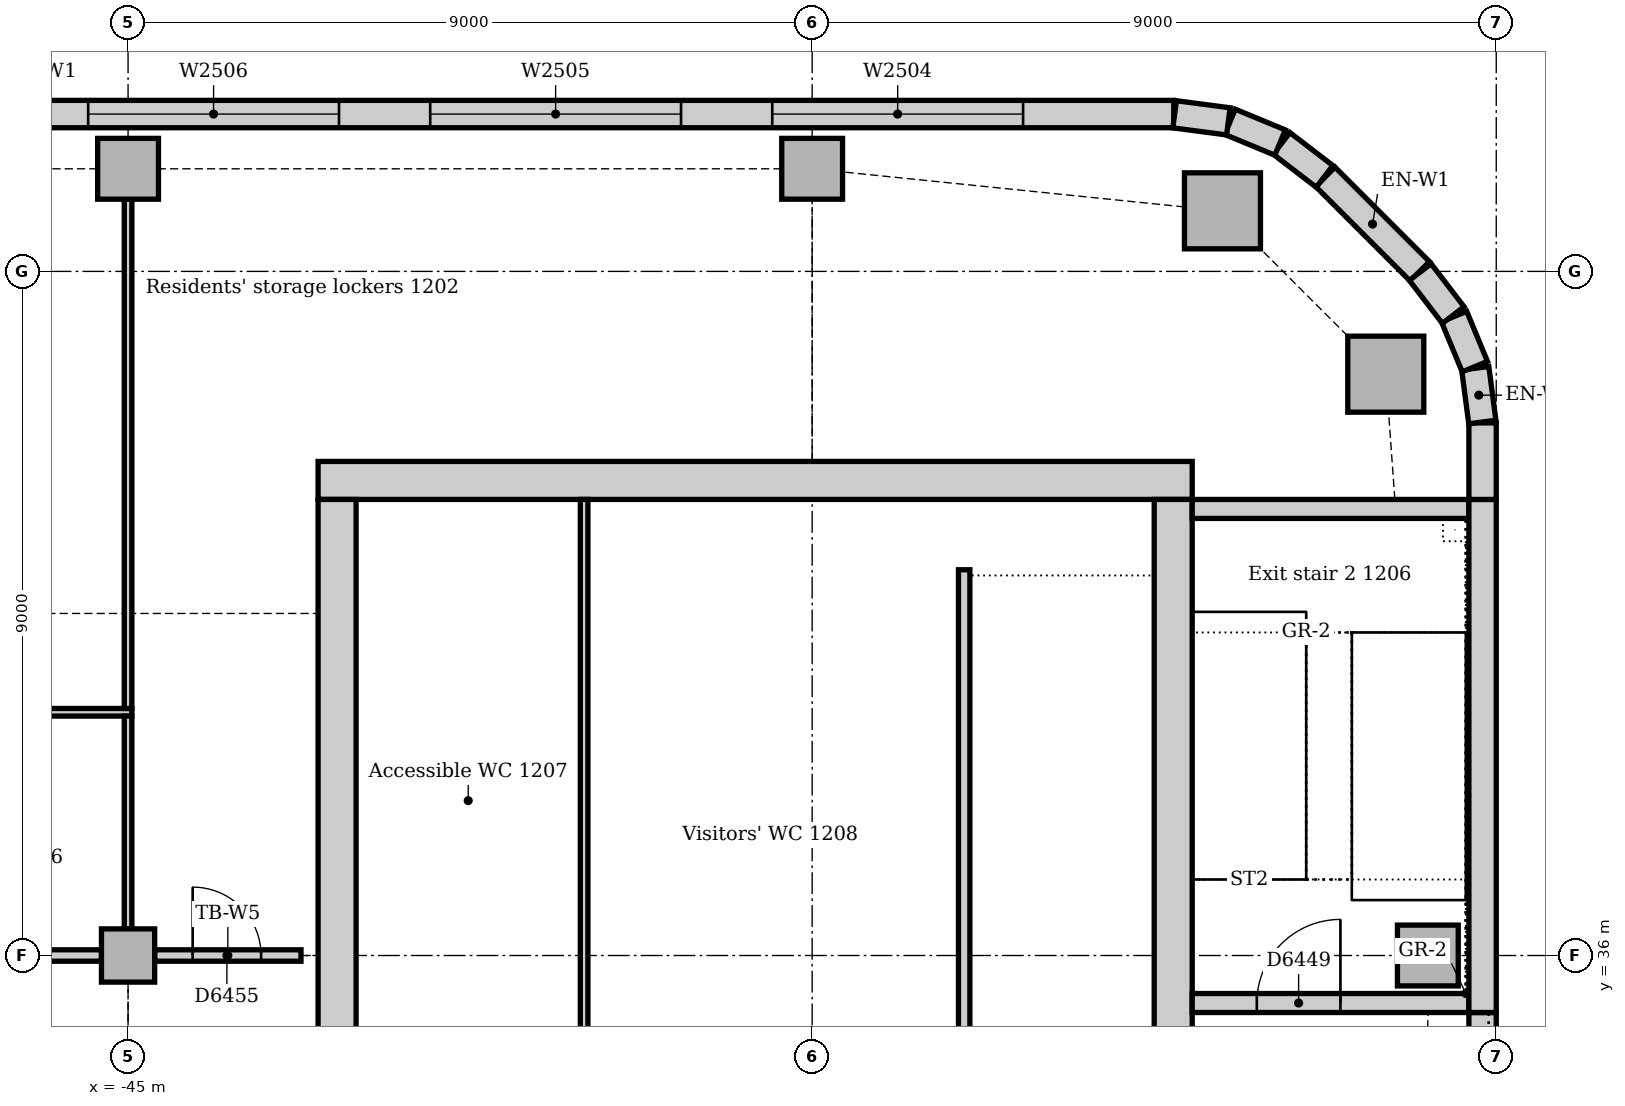
"""IFC4 building model, lengths in metres.
Left out: names, types, materials, properties, quantities, classifications, styles, units other than length and angle.
Written with IfcOpenShell. Run it as: python <this file> out.ifc"""

import sys

from ifc_helpers import new_model, si_unit, direction, frame, frame_2d, origin, origin_2d, place, context, subcontext, project, spatial, rectangle, extrude, element, fill, save


model = new_model("IFC4")
c1 = context("Model", 3, precision=1e-05, world=origin(), true_north=direction((0.0, 1.0)))
c2 = subcontext(c1, "Body", "Model", "MODEL_VIEW")
j1 = project(units=[si_unit("LENGTHUNIT", "METRE"), si_unit("PLANEANGLEUNIT", "RADIAN")], contexts=[c1])
p1 = place(None, origin())
s1 = spatial("IfcSite", under=j1, at=p1, CompositionType="ELEMENT")
p2 = place(p1, origin())
s2 = spatial("IfcBuilding", under=s1, at=p2, CompositionType="ELEMENT")
p3 = place(p2, frame((0.0, 0.0, 55.0)))
s3 = spatial("IfcBuildingStorey", under=s2, at=p3, CompositionType="ELEMENT", Elevation=55.0)
p4 = place(p3, frame((-31.0, 42.25, 0.0), z_axis=(0.0, 0.0, 1.0), x_axis=(-1.0, 0.0, 0.0)))
e1 = element("IfcWall", 1, at=p4, inside=s3, PredefinedType="SOLIDWALL", context=c2, shape_type="SweptSolid", body=[
    extrude(rectangle(XDim=11.5, YDim=0.5, at=frame_2d((5.75, 0.0))), origin(), (0.0, 0.0, 1.0), 4.0),
])
p5 = place(p3, frame((-31.25, 30.5, 0.0), z_axis=(0.0, 0.0, 1.0), x_axis=(0.0, 1.0, 0.0)))
e2 = element("IfcWall", 2, at=p5, inside=s3, PredefinedType="SOLIDWALL", context=c2, shape_type="SweptSolid", body=[
    extrude(rectangle(XDim=11.5, YDim=0.5, at=frame_2d((5.75, 0.0))), origin(), (0.0, 0.0, 1.0), 4.0),
])
p6 = place(p5, frame((0.85, 0.0, 0.0)))
e3 = element("IfcOpeningElement", 3, at=p6, cuts=e2, PredefinedType="OPENING", context=c2, shape_type="SweptSolid", body=[
    extrude(rectangle(XDim=1.8, YDim=2.1, at=frame_2d((0.9, 1.05))), frame((0.0, 0.26, 0.0), z_axis=(0.0, -1.0, 0.0), x_axis=(1.0, 0.0, 0.0)), (0.0, 0.0, 1.0), 0.52),
])
p7 = place(p3, frame((-42.25, 42.0, 0.0), z_axis=(0.0, 0.0, 1.0), x_axis=(0.0, -1.0, 0.0)))
e4 = element("IfcWall", 4, at=p7, inside=s3, PredefinedType="SOLIDWALL", context=c2, shape_type="SweptSolid", body=[
    extrude(rectangle(XDim=11.5, YDim=0.5, at=frame_2d((5.75, 0.0))), origin(), (0.0, 0.0, 1.0), 4.0),
])
p8 = place(p7, frame((8.85, 0.0, 0.0)))
e5 = element("IfcOpeningElement", 5, at=p8, cuts=e4, PredefinedType="OPENING", context=c2, shape_type="SweptSolid", body=[
    extrude(rectangle(XDim=1.8, YDim=2.1, at=frame_2d((0.9, 1.05))), frame((0.0, 0.26, 0.0), z_axis=(0.0, -1.0, 0.0), x_axis=(1.0, 0.0, 0.0)), (0.0, 0.0, 1.0), 0.52),
])
p9 = place(p3, frame((-31.0, 35.375, 0.0), z_axis=(0.0, 0.0, 1.0), x_axis=(1.0, 0.0, 0.0)))
e6 = element("IfcWall", 6, at=p9, inside=s3, PredefinedType="SOLIDWALL", context=c2, shape_type="SweptSolid", body=[
    extrude(rectangle(XDim=3.64, YDim=0.25, at=frame_2d((1.82, 0.0))), origin(), (0.0, 0.0, 1.0), 4.0),
])
p10 = place(p9, frame((0.85, 0.0, 0.0)))
e7 = element("IfcOpeningElement", 7, at=p10, cuts=e6, PredefinedType="OPENING", context=c2, shape_type="SweptSolid", body=[
    extrude(rectangle(XDim=1.1, YDim=2.1, at=frame_2d((0.55, 1.05))), frame((0.0, 0.135, 0.0), z_axis=(0.0, -1.0, 0.0), x_axis=(1.0, 0.0, 0.0)), (0.0, 0.0, 1.0), 0.27),
])
p11 = place(p3, frame((-27.36, 41.875, 0.0), z_axis=(0.0, 0.0, 1.0), x_axis=(-1.0, 0.0, 0.0)))
e8 = element("IfcWall", 8, at=p11, inside=s3, PredefinedType="SOLIDWALL", context=c2, shape_type="SweptSolid", body=[
    extrude(rectangle(XDim=3.64, YDim=0.25, at=frame_2d((1.82, 0.0))), origin(), (0.0, 0.0, 1.0), 4.0),
])
for number, where, z_axis, x_axis in (
    (9, (-28.453, 43.648, 0.0), (0.0, 0.0, 1.0), (1.0, 0.0, 0.0)),
    (10, (-30.602, 45.797, 0.0), (0.0, 0.0, 1.0), (1.0, 0.0, 0.0)),
):
    element("IfcColumn", number, at=place(p3, frame(where, z_axis=z_axis, x_axis=x_axis)), inside=s3, PredefinedType="COLUMN", context=c2, shape_type="SweptSolid", body=[
        extrude(rectangle(XDim=1.0, YDim=1.0, at=origin_2d()), origin(), (0.0, 0.0, 1.0), 3.85),
    ])
p12 = place(p3, frame((-27.9, 36.0, 0.0), z_axis=(0.0, 0.0, 1.0), x_axis=(1.0, 0.0, 0.0)))
e11 = element("IfcColumn", 11, at=p12, inside=s3, PredefinedType="COLUMN", context=c2, shape_type="SweptSolid", body=[
    extrude(rectangle(XDim=0.8, YDim=0.8, at=origin_2d()), origin(), (0.0, 0.0, 1.0), 4.0),
])
for number, where, z_axis, x_axis in (
    (12, (-45.0, 46.35, 0.0), (0.0, 0.0, 1.0), (1.0, 0.0, 0.0)),
    (13, (-36.0, 46.35, 0.0), (0.0, 0.0, 1.0), (1.0, 0.0, 0.0)),
):
    element("IfcColumn", number, at=place(p3, frame(where, z_axis=z_axis, x_axis=x_axis)), inside=s3, PredefinedType="COLUMN", context=c2, shape_type="SweptSolid", body=[
        extrude(rectangle(XDim=0.8, YDim=0.8, at=origin_2d()), origin(), (0.0, 0.0, 1.0), 3.85),
    ])
p13 = place(p3, frame((-45.0, 36.0, 0.0), z_axis=(0.0, 0.0, 1.0), x_axis=(1.0, 0.0, 0.0)))
e14 = element("IfcColumn", 14, at=p13, inside=s3, PredefinedType="COLUMN", context=c2, shape_type="SweptSolid", body=[
    extrude(rectangle(XDim=0.7, YDim=0.7, at=origin_2d()), origin(), (0.0, 0.0, 1.0), 3.85),
])
p14 = place(p3, frame((-27.18, 27.75, 0.0), z_axis=(0.0, 0.0, 1.0), x_axis=(0.0, 1.0, 0.0)))
e15 = element("IfcWall", 15, at=p14, inside=s3, PredefinedType="STANDARD", context=c2, shape_type="SweptSolid", body=[
    extrude(rectangle(XDim=7.5, YDim=0.36, at=frame_2d((3.75, 0.0))), origin(), (0.0, 0.0, 1.0), 3.85),
])
p15 = place(p14, frame((2.85, 0.0, 1.2)))
e16 = element("IfcOpeningElement", 16, at=p15, cuts=e15, PredefinedType="OPENING", context=c2, shape_type="SweptSolid", body=[
    extrude(rectangle(XDim=1.8, YDim=1.2, at=frame_2d((0.9, 0.6))), frame((0.0, 0.19, 0.0), z_axis=(0.0, -1.0, 0.0), x_axis=(1.0, 0.0, 0.0)), (0.0, 0.0, 1.0), 0.38),
])
p16 = place(p3, frame((-27.18, 35.25, 0.0), z_axis=(0.0, 0.0, 1.0), x_axis=(0.0, 1.0, 0.0)))
e17 = element("IfcWall", 17, at=p16, inside=s3, PredefinedType="STANDARD", context=c2, shape_type="SweptSolid", body=[
    extrude(rectangle(XDim=6.75, YDim=0.36, at=frame_2d((3.375, 0.0))), origin(), (0.0, 0.0, 1.0), 3.85),
])
p17 = place(p3, frame((-27.18, 42.0, 0.0), z_axis=(0.0, 0.0, 1.0), x_axis=(0.0, 1.0, 0.0)))
e18 = element("IfcWall", 18, at=p17, inside=s3, PredefinedType="STANDARD", context=c2, shape_type="SweptSolid", body=[
    extrude(rectangle(XDim=1.007, YDim=0.36, at=frame_2d((0.504, 0.0))), origin(), (0.0, 0.0, 1.0), 3.85),
])
p18 = place(p3, frame((-28.006, 45.001, 0.0), z_axis=(0.0, 0.0, 1.0), x_axis=(-0.707106781187, 0.707106781187, 0.0)))
e19 = element("IfcWall", 19, at=p18, inside=s3, PredefinedType="STANDARD", context=c2, shape_type="SweptSolid", body=[
    extrude(rectangle(XDim=1.757, YDim=0.36, at=frame_2d((0.879, 0.0))), origin(), (0.0, 0.0, 1.0), 3.85),
])
p19 = place(p3, frame((-31.243, 47.07, 0.0), z_axis=(0.0, 0.0, 1.0), x_axis=(-1.0, 0.0, 0.0)))
e20 = element("IfcWall", 20, at=p19, inside=s3, PredefinedType="STANDARD", context=c2, shape_type="SweptSolid", body=[
    extrude(rectangle(XDim=29.765, YDim=0.36, at=frame_2d((14.882, 0.0))), origin(), (0.0, 0.0, 1.0), 3.85),
])
p20 = place(p19, frame((1.982, 0.0, 0.9)))
e21 = element("IfcOpeningElement", 21, at=p20, cuts=e20, PredefinedType="OPENING", context=c2, shape_type="SweptSolid", body=[
    extrude(rectangle(XDim=3.3, YDim=1.6, at=frame_2d((1.65, 0.8))), frame((0.0, 0.19, 0.0), z_axis=(0.0, -1.0, 0.0), x_axis=(1.0, 0.0, 0.0)), (0.0, 0.0, 1.0), 0.38),
])
p21 = place(p19, frame((6.482, 0.0, 0.9)))
e22 = element("IfcOpeningElement", 22, at=p21, cuts=e20, PredefinedType="OPENING", context=c2, shape_type="SweptSolid", body=[
    extrude(rectangle(XDim=3.3, YDim=1.6, at=frame_2d((1.65, 0.8))), frame((0.0, 0.19, 0.0), z_axis=(0.0, -1.0, 0.0), x_axis=(1.0, 0.0, 0.0)), (0.0, 0.0, 1.0), 0.38),
])
p22 = place(p19, frame((10.982, 0.0, 0.9)))
e23 = element("IfcOpeningElement", 23, at=p22, cuts=e20, PredefinedType="OPENING", context=c2, shape_type="SweptSolid", body=[
    extrude(rectangle(XDim=3.3, YDim=1.6, at=frame_2d((1.65, 0.8))), frame((0.0, 0.19, 0.0), z_axis=(0.0, -1.0, 0.0), x_axis=(1.0, 0.0, 0.0)), (0.0, 0.0, 1.0), 0.38),
])
p23 = place(p19, frame((15.482, 0.0, 0.9)))
e24 = element("IfcOpeningElement", 24, at=p23, cuts=e20, PredefinedType="OPENING", context=c2, shape_type="SweptSolid", body=[
    extrude(rectangle(XDim=3.3, YDim=1.6, at=frame_2d((1.65, 0.8))), frame((0.0, 0.19, 0.0), z_axis=(0.0, -1.0, 0.0), x_axis=(1.0, 0.0, 0.0)), (0.0, 0.0, 1.0), 0.38),
])
p24 = place(p19, frame((19.982, 0.0, 0.9)))
e25 = element("IfcOpeningElement", 25, at=p24, cuts=e20, PredefinedType="OPENING", context=c2, shape_type="SweptSolid", body=[
    extrude(rectangle(XDim=3.3, YDim=1.6, at=frame_2d((1.65, 0.8))), frame((0.0, 0.19, 0.0), z_axis=(0.0, -1.0, 0.0), x_axis=(1.0, 0.0, 0.0)), (0.0, 0.0, 1.0), 0.38),
])
p25 = place(p19, frame((24.482, 0.0, 0.9)))
e26 = element("IfcOpeningElement", 26, at=p25, cuts=e20, PredefinedType="OPENING", context=c2, shape_type="SweptSolid", body=[
    extrude(rectangle(XDim=3.3, YDim=1.6, at=frame_2d((1.65, 0.8))), frame((0.0, 0.19, 0.0), z_axis=(0.0, -1.0, 0.0), x_axis=(1.0, 0.0, 0.0)), (0.0, 0.0, 1.0), 0.38),
])
for number, where, z_axis, x_axis in (
    (27, (-27.183, 43.019, 0.0), (0.0, 0.0, 1.0), (-0.131, 0.991, 0.0)),
    (28, (-27.282, 43.747, 0.0), (0.0, 0.0, 1.0), (-0.383, 0.924, 0.0)),
):
    element("IfcWall", number, at=place(p3, frame(where, z_axis=z_axis, x_axis=x_axis)), inside=s3, PredefinedType="STANDARD", context=c2, shape_type="SweptSolid", body=[
        extrude(rectangle(XDim=0.713, YDim=0.36, at=frame_2d((0.356, 0.0))), origin(), (0.0, 0.0, 1.0), 3.85),
    ])
for number, where, z_axis, x_axis in (
    (29, (-27.566, 44.425, 0.0), (0.0, 0.0, 1.0), (-0.609, 0.793, 0.0)),
    (30, (-29.259, 46.25, 0.0), (0.0, 0.0, 1.0), (-0.793, 0.609, 0.0)),
):
    element("IfcWall", number, at=place(p3, frame(where, z_axis=z_axis, x_axis=x_axis)), inside=s3, PredefinedType="STANDARD", context=c2, shape_type="SweptSolid", body=[
        extrude(rectangle(XDim=0.713, YDim=0.36, at=frame_2d((0.357, 0.0))), origin(), (0.0, 0.0, 1.0), 3.85),
    ])
for number, where, z_axis, x_axis in (
    (31, (-29.844, 46.695, 0.0), (0.0, 0.0, 1.0), (-0.924, 0.383, 0.0)),
    (32, (-30.524, 46.974, 0.0), (0.0, 0.0, 1.0), (-0.991, 0.131, 0.0)),
):
    element("IfcWall", number, at=place(p3, frame(where, z_axis=z_axis, x_axis=x_axis)), inside=s3, PredefinedType="STANDARD", context=c2, shape_type="SweptSolid", body=[
        extrude(rectangle(XDim=0.713, YDim=0.36, at=frame_2d((0.356, 0.0))), origin(), (0.0, 0.0, 1.0), 3.85),
    ])
p26 = place(p3, frame((-34.0, 41.075, 0.0), z_axis=(0.0, 0.0, 1.0), x_axis=(0.0, -1.0, 0.0)))
e33 = element("IfcWall", 33, at=p26, inside=s3, PredefinedType="SOLIDWALL", context=c2, shape_type="SweptSolid", body=[
    extrude(rectangle(XDim=7.0, YDim=0.15, at=frame_2d((3.5, 0.0))), origin(), (0.0, 0.0, 1.0), 4.0),
])
p27 = place(p3, frame((-39.0, 34.075, 0.0), z_axis=(0.0, 0.0, 1.0), x_axis=(0.0, 1.0, 0.0)))
e34 = element("IfcWall", 34, at=p27, inside=s3, PredefinedType="PARTITIONING", context=c2, shape_type="SweptSolid", body=[
    extrude(rectangle(XDim=7.925, YDim=0.1, at=frame_2d((3.962, 0.0))), origin(), (0.0, 0.0, 1.0), 3.85),
])
p28 = place(p3, frame((-44.65, 36.0, 0.0), z_axis=(0.0, 0.0, 1.0), x_axis=(1.0, 0.0, 0.0)))
e35 = element("IfcWall", 35, at=p28, inside=s3, PredefinedType="PARTITIONING", context=c2, shape_type="SweptSolid", body=[
    extrude(rectangle(XDim=1.925, YDim=0.15, at=frame_2d((0.963, 0.0))), origin(), (0.0, 0.0, 1.0), 3.602),
])
p29 = place(p28, frame((0.5, 0.0, 0.0)))
e36 = element("IfcOpeningElement", 36, at=p29, cuts=e35, PredefinedType="OPENING", context=c2, shape_type="SweptSolid", body=[
    extrude(rectangle(XDim=0.9, YDim=2.1, at=frame_2d((0.45, 1.05))), frame((0.0, 0.085, 0.0), z_axis=(0.0, -1.0, 0.0), x_axis=(1.0, 0.0, 0.0)), (0.0, 0.0, 1.0), 0.17),
])
p30 = place(p3, frame((-53.65, 36.0, 0.0), z_axis=(0.0, 0.0, 1.0), x_axis=(1.0, 0.0, 0.0)))
e37 = element("IfcWall", 37, at=p30, inside=s3, PredefinedType="PARTITIONING", context=c2, shape_type="SweptSolid", body=[
    extrude(rectangle(XDim=8.3, YDim=0.15, at=frame_2d((4.15, 0.0))), origin(), (0.0, 0.0, 1.0), 3.158),
])
p31 = place(p30, frame((2.94, 0.0, 0.0)))
e38 = element("IfcOpeningElement", 38, at=p31, cuts=e37, PredefinedType="OPENING", context=c2, shape_type="SweptSolid", body=[
    extrude(rectangle(XDim=1.0, YDim=2.1, at=frame_2d((0.5, 1.05))), frame((0.0, 0.085, 0.0), z_axis=(0.0, -1.0, 0.0), x_axis=(1.0, 0.0, 0.0)), (0.0, 0.0, 1.0), 0.17),
])
p32 = place(p3, frame((-53.925, 39.2, 0.0), z_axis=(0.0, 0.0, 1.0), x_axis=(1.0, 0.0, 0.0)))
e39 = element("IfcWall", 39, at=p32, inside=s3, PredefinedType="PARTITIONING", context=c2, shape_type="SweptSolid", body=[
    extrude(rectangle(XDim=8.975, YDim=0.1, at=frame_2d((4.487, 0.0))), origin(), (0.0, 0.0, 1.0), 3.85),
])
p33 = place(p32, frame((3.265, 0.0, 0.0)))
e40 = element("IfcOpeningElement", 40, at=p33, cuts=e39, PredefinedType="OPENING", context=c2, shape_type="SweptSolid", body=[
    extrude(rectangle(XDim=0.9, YDim=2.1, at=frame_2d((0.45, 1.05))), frame((0.0, 0.06, 0.0), z_axis=(0.0, -1.0, 0.0), x_axis=(1.0, 0.0, 0.0)), (0.0, 0.0, 1.0), 0.12),
])
p34 = place(p3, frame((-45.0, 39.25, 0.0), z_axis=(0.0, 0.0, 1.0), x_axis=(0.0, 1.0, 0.0)))
e41 = element("IfcWall", 41, at=p34, inside=s3, PredefinedType="PARTITIONING", context=c2, shape_type="SweptSolid", body=[
    extrude(rectangle(XDim=6.7, YDim=0.1, at=frame_2d((3.35, 0.0))), origin(), (0.0, 0.0, 1.0), 3.256),
])
p35 = place(p3, frame((-45.0, 36.35, 0.0), z_axis=(0.0, 0.0, 1.0), x_axis=(0.0, 1.0, 0.0)))
e42 = element("IfcWall", 42, at=p35, inside=s3, PredefinedType="PARTITIONING", context=c2, shape_type="SweptSolid", body=[
    extrude(rectangle(XDim=2.8, YDim=0.1, at=frame_2d((1.4, 0.0))), origin(), (0.0, 0.0, 1.0), 3.256),
])
p36 = place(p20, origin())
e43 = element("IfcWindow", 43, at=p36, inside=s3, PartitioningType="SINGLE_PANEL", PredefinedType="WINDOW", context=c2, shape_type="SweptSolid", body=[
    extrude(rectangle(XDim=3.3, YDim=1.6, at=frame_2d((1.65, 0.8))), frame((0.0, 0.13, 0.0), z_axis=(0.0, -1.0, 0.0), x_axis=(1.0, 0.0, 0.0)), (0.0, 0.0, 1.0), 0.06),
])
fill(e21, e43)
p37 = place(p21, origin())
e44 = element("IfcWindow", 44, at=p37, inside=s3, PartitioningType="SINGLE_PANEL", PredefinedType="WINDOW", context=c2, shape_type="SweptSolid", body=[
    extrude(rectangle(XDim=3.3, YDim=1.6, at=frame_2d((1.65, 0.8))), frame((0.0, 0.13, 0.0), z_axis=(0.0, -1.0, 0.0), x_axis=(1.0, 0.0, 0.0)), (0.0, 0.0, 1.0), 0.06),
])
fill(e22, e44)
p38 = place(p22, origin())
e45 = element("IfcWindow", 45, at=p38, inside=s3, PartitioningType="SINGLE_PANEL", PredefinedType="WINDOW", context=c2, shape_type="SweptSolid", body=[
    extrude(rectangle(XDim=3.3, YDim=1.6, at=frame_2d((1.65, 0.8))), frame((0.0, 0.13, 0.0), z_axis=(0.0, -1.0, 0.0), x_axis=(1.0, 0.0, 0.0)), (0.0, 0.0, 1.0), 0.06),
])
fill(e23, e45)
p39 = place(p10, origin())
e46 = element("IfcDoor", 46, at=p39, inside=s3, OperationType="SINGLE_SWING_RIGHT", PredefinedType="DOOR", context=c2, shape_type="SweptSolid", body=[
    extrude(rectangle(XDim=1.1, YDim=2.1, at=frame_2d((0.55, 1.05))), frame((0.0, 0.025, 0.0), z_axis=(0.0, -1.0, 0.0), x_axis=(1.0, 0.0, 0.0)), (0.0, 0.0, 1.0), 0.05),
])
fill(e7, e46)
p40 = place(p29, origin())
e47 = element("IfcDoor", 47, at=p40, inside=s3, OperationType="SINGLE_SWING_LEFT", PredefinedType="DOOR", context=c2, shape_type="SweptSolid", body=[
    extrude(rectangle(XDim=0.9, YDim=2.1, at=frame_2d((0.45, 1.05))), frame((0.0, 0.025, 0.0), z_axis=(0.0, -1.0, 0.0), x_axis=(1.0, 0.0, 0.0)), (0.0, 0.0, 1.0), 0.05),
])
fill(e36, e47)
save(model, sys.argv[1])
